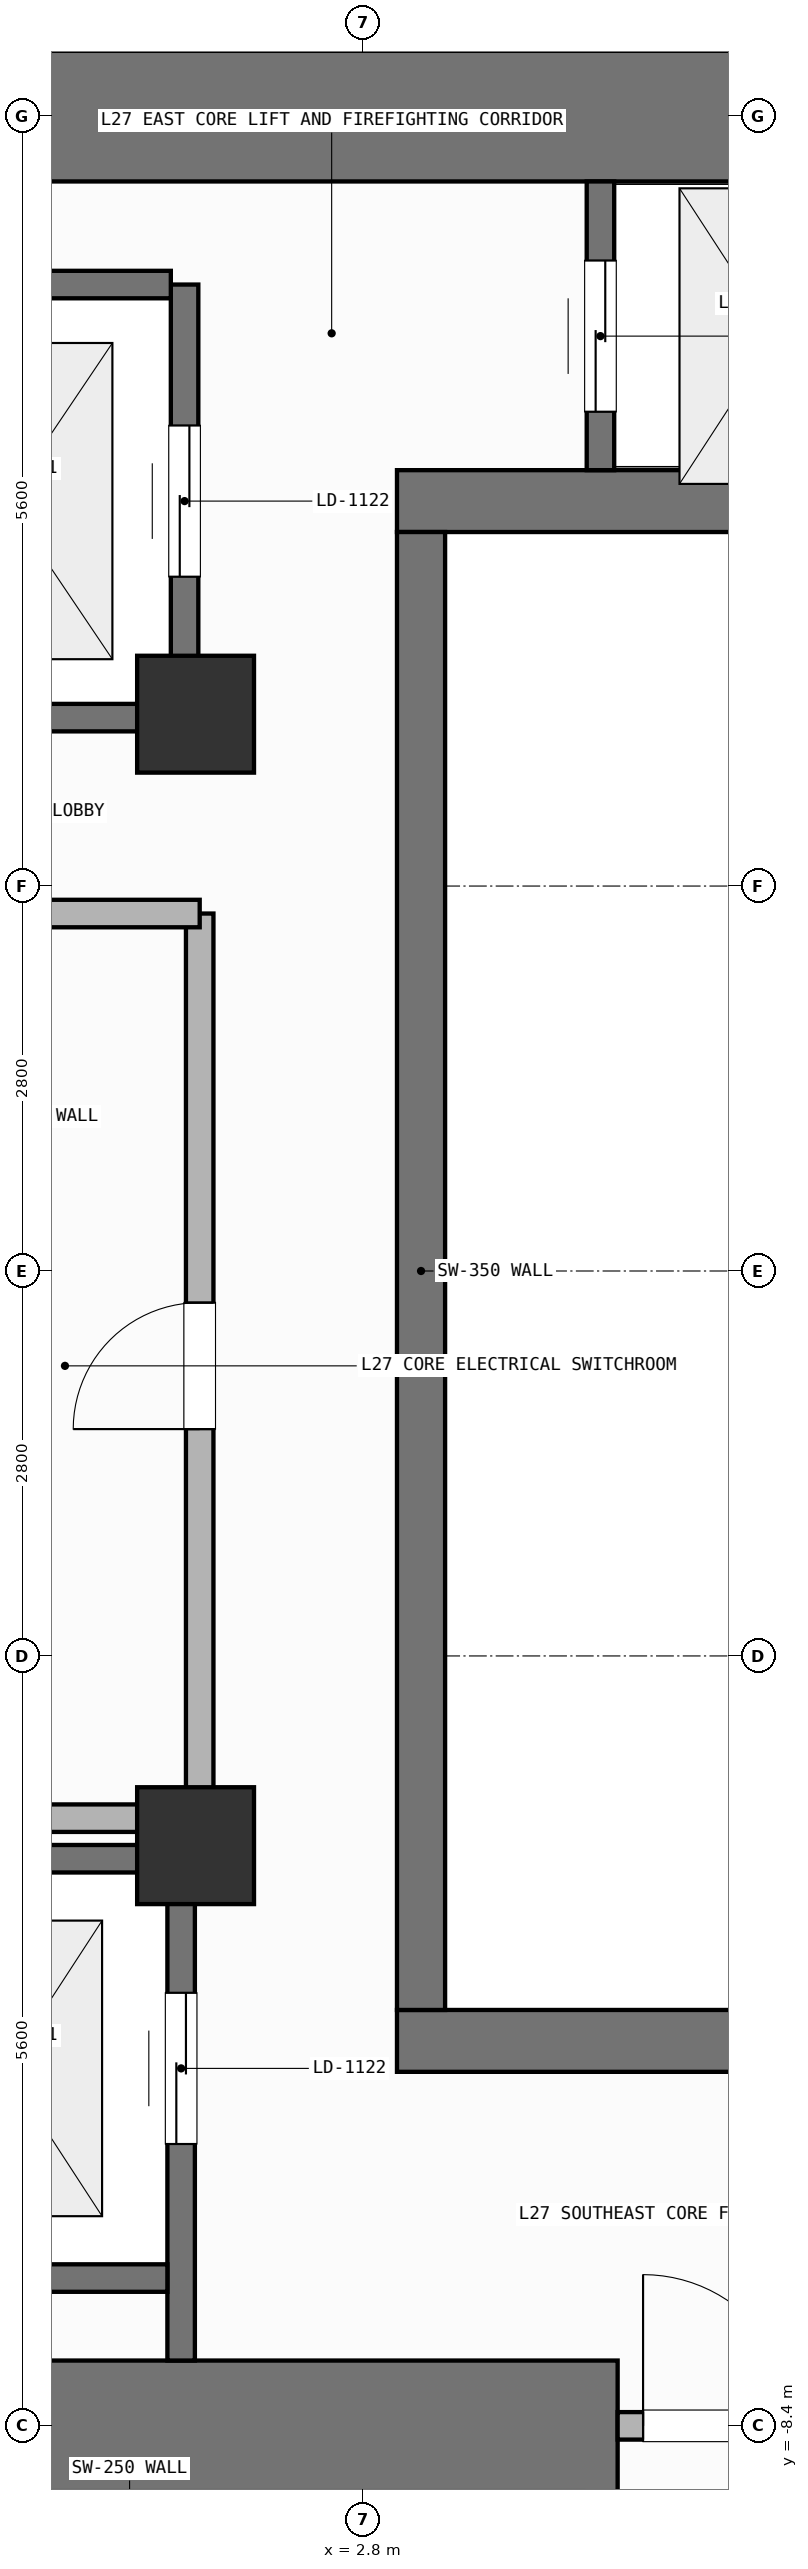
"""IFC4 building model, lengths in metres.
Left out: names, types, materials, properties, quantities, classifications, styles, units other than length and angle.
Written with IfcOpenShell. Run it as: python <this file> out.ifc"""

import sys

from ifc_helpers import new_model, si_unit, direction, frame, frame_2d, origin, origin_2d, place, context, subcontext, project, spatial, rectangle, extrude, element, fill, save


model = new_model("IFC4")
c1 = context("Model", 3, precision=1e-05, world=origin(), true_north=direction((0.0, 1.0)))
c2 = subcontext(c1, "Body", "Model", "MODEL_VIEW")
j1 = project(units=[si_unit("LENGTHUNIT", "METRE"), si_unit("PLANEANGLEUNIT", "RADIAN")], contexts=[c1])
p1 = place(None, origin())
s1 = spatial("IfcSite", under=j1, at=p1, CompositionType="ELEMENT")
p2 = place(p1, origin())
s2 = spatial("IfcBuilding", under=s1, at=p2, CompositionType="ELEMENT")
p3 = place(p2, frame((0.0, 0.0, 108.6)))
s3 = spatial("IfcBuildingStorey", under=s2, at=p3, CompositionType="ELEMENT", Elevation=108.6)
p4 = place(p3, frame((-2.62, -8.4, 0.0), z_axis=(0.0, 0.0, 1.0), x_axis=(1.0, 0.0, 0.0)))
e1 = element("IfcWall", 1, at=p4, inside=s3, PredefinedType="SHEAR", context=c2, shape_type="SweptSolid", body=[
    extrude(rectangle(XDim=7.27, YDim=0.95, at=frame_2d((3.635, 0.0))), origin(), (0.0, 0.0, 1.0), 4.8),
])
p5 = place(p3, frame((-7.55, 8.4, 0.0), z_axis=(0.0, 0.0, 1.0), x_axis=(1.0, 0.0, 0.0)))
e2 = element("IfcWall", 2, at=p5, inside=s3, PredefinedType="SHEAR", context=c2, shape_type="SweptSolid", body=[
    extrude(rectangle(XDim=16.425, YDim=0.95, at=frame_2d((8.212, 0.0))), origin(), (0.0, 0.0, 1.0), 4.8),
])
for number, where, z_axis, x_axis in (
    (3, (3.045, -5.6, 0.0), (0.0, 0.0, 1.0), (1.0, 0.0, 0.0)),
    (4, (3.045, 5.6, 0.0), (0.0, 0.0, 1.0), (1.0, 0.0, 0.0)),
):
    element("IfcWall", number, at=place(p3, frame(where, z_axis=z_axis, x_axis=x_axis)), inside=s3, PredefinedType="SHEAR", context=c2, shape_type="SweptSolid", body=[
        extrude(rectangle(XDim=5.83, YDim=0.45, at=frame_2d((2.915, 0.0))), origin(), (0.0, 0.0, 1.0), 4.8),
    ])
p6 = place(p3, frame((3.22, -5.375, 0.0), z_axis=(0.0, 0.0, 1.0), x_axis=(0.0, 1.0, 0.0)))
e5 = element("IfcWall", 5, at=p6, inside=s3, PredefinedType="SHEAR", context=c2, shape_type="SweptSolid", body=[
    extrude(rectangle(XDim=10.75, YDim=0.35, at=frame_2d((5.375, 0.0))), origin(), (0.0, 0.0, 1.0), 4.8),
])
for number, where, z_axis, x_axis in (
    (6, (1.58, -4.18, 0.0), (0.0, 0.0, 1.0), (1.0, 0.0, 0.0)),
    (7, (1.58, 4.05, 0.0), (0.0, 0.0, 1.0), (1.0, 0.0, 0.0)),
):
    element("IfcColumn", number, at=place(p3, frame(where, z_axis=z_axis, x_axis=x_axis)), inside=s3, PredefinedType="COLUMN", context=c2, shape_type="SweptSolid", body=[
        extrude(rectangle(XDim=0.85, YDim=0.85, at=origin_2d()), origin(), (0.0, 0.0, 1.0), 4.8),
    ])
p7 = place(p3, frame((1.5, 4.025, 0.0), z_axis=(0.0, 0.0, 1.0), x_axis=(0.0, 1.0, 0.0)))
e8 = element("IfcWall", 8, at=p7, inside=s3, PredefinedType="SHEAR", context=c2, shape_type="SweptSolid", body=[
    extrude(rectangle(XDim=3.15, YDim=0.2, at=frame_2d((1.575, 0.0))), origin(), (0.0, 0.0, 1.0), 4.58),
])
p8 = place(p7, frame((1.025, 0.0, 0.0)))
e9 = element("IfcOpeningElement", 9, at=p8, cuts=e8, PredefinedType="OPENING", context=c2, shape_type="SweptSolid", body=[
    extrude(rectangle(XDim=1.1, YDim=2.2, at=frame_2d((0.55, 1.1))), frame((0.0, 0.11, 0.0), z_axis=(0.0, -1.0, 0.0), x_axis=(1.0, 0.0, 0.0)), (0.0, 0.0, 1.0), 0.22),
])
for number, where, z_axis, x_axis in (
    (10, (-1.0, 4.025, 0.0), (0.0, 0.0, 1.0), (1.0, 0.0, 0.0)),
    (11, (-1.0, 7.175, 0.0), (0.0, 0.0, 1.0), (1.0, 0.0, 0.0)),
):
    element("IfcWall", number, at=place(p3, frame(where, z_axis=z_axis, x_axis=x_axis)), inside=s3, PredefinedType="SHEAR", context=c2, shape_type="SweptSolid", body=[
        extrude(rectangle(XDim=2.4, YDim=0.2, at=frame_2d((1.2, 0.0))), origin(), (0.0, 0.0, 1.0), 4.58),
    ])
p9 = place(p3, frame((1.475, -7.925, 0.0), z_axis=(0.0, 0.0, 1.0), x_axis=(0.0, 1.0, 0.0)))
e12 = element("IfcWall", 12, at=p9, inside=s3, PredefinedType="SHEAR", context=c2, shape_type="SweptSolid", body=[
    extrude(rectangle(XDim=3.65, YDim=0.2, at=frame_2d((1.825, 0.0))), origin(), (0.0, 0.0, 1.0), 4.58),
])
p10 = place(p9, frame((1.575, 0.0, 0.0)))
e13 = element("IfcOpeningElement", 13, at=p10, cuts=e12, PredefinedType="OPENING", context=c2, shape_type="SweptSolid", body=[
    extrude(rectangle(XDim=1.1, YDim=2.2, at=frame_2d((0.55, 1.1))), frame((0.0, 0.11, 0.0), z_axis=(0.0, -1.0, 0.0), x_axis=(1.0, 0.0, 0.0)), (0.0, 0.0, 1.0), 0.22),
])
for number, where, z_axis, x_axis in (
    (14, (-0.975, -7.325, 0.0), (0.0, 0.0, 1.0), (1.0, 0.0, 0.0)),
    (15, (-0.975, -4.275, 0.0), (0.0, 0.0, 1.0), (1.0, 0.0, 0.0)),
):
    element("IfcWall", number, at=place(p3, frame(where, z_axis=z_axis, x_axis=x_axis)), inside=s3, PredefinedType="SHEAR", context=c2, shape_type="SweptSolid", body=[
        extrude(rectangle(XDim=2.35, YDim=0.2, at=frame_2d((1.175, 0.0))), origin(), (0.0, 0.0, 1.0), 4.58),
    ])
p11 = place(p3, frame((4.525, 5.825, 0.0), z_axis=(0.0, 0.0, 1.0), x_axis=(0.0, 1.0, 0.0)))
e16 = element("IfcWall", 16, at=p11, inside=s3, PredefinedType="SHEAR", context=c2, shape_type="SweptSolid", body=[
    extrude(rectangle(XDim=2.1, YDim=0.2, at=frame_2d((1.05, 0.0))), origin(), (0.0, 0.0, 1.0), 4.58),
])
p12 = place(p11, frame((0.425, 0.0, 0.0)))
e17 = element("IfcOpeningElement", 17, at=p12, cuts=e16, PredefinedType="OPENING", context=c2, shape_type="SweptSolid", body=[
    extrude(rectangle(XDim=1.1, YDim=2.2, at=frame_2d((0.55, 1.1))), frame((0.0, 0.11, 0.0), z_axis=(0.0, -1.0, 0.0), x_axis=(1.0, 0.0, 0.0)), (0.0, 0.0, 1.0), 0.22),
])
p13 = place(p3, frame((4.65, -8.4, 0.0), z_axis=(0.0, 0.0, 1.0), x_axis=(1.0, 0.0, 0.0)))
e18 = element("IfcWall", 18, at=p13, inside=s3, PredefinedType="SOLIDWALL", context=c2, shape_type="SweptSolid", body=[
    extrude(rectangle(XDim=1.47, YDim=0.2, at=frame_2d((0.735, 0.0))), origin(), (0.0, 0.0, 1.0), 3.62),
])
p14 = place(p13, frame((0.185, 0.0, 0.0)))
e19 = element("IfcOpeningElement", 19, at=p14, cuts=e18, PredefinedType="OPENING", context=c2, shape_type="SweptSolid", body=[
    extrude(rectangle(XDim=1.1, YDim=2.15, at=frame_2d((0.55, 1.075))), frame((0.0, 0.11, 0.0), z_axis=(0.0, -1.0, 0.0), x_axis=(1.0, 0.0, 0.0)), (0.0, 0.0, 1.0), 0.22),
])
p15 = place(p3, frame((1.61, -3.98, 0.0), z_axis=(0.0, 0.0, 1.0), x_axis=(0.0, 1.0, 0.0)))
e20 = element("IfcWall", 20, at=p15, inside=s3, PredefinedType="SOLIDWALL", context=c2, shape_type="SweptSolid", body=[
    extrude(rectangle(XDim=6.58, YDim=0.2, at=frame_2d((3.29, 0.0))), origin(), (0.0, 0.0, 1.0), 4.58),
])
p16 = place(p15, frame((2.83, 0.0, 0.0)))
e21 = element("IfcOpeningElement", 21, at=p16, cuts=e20, PredefinedType="OPENING", context=c2, shape_type="SweptSolid", body=[
    extrude(rectangle(XDim=0.92, YDim=2.1, at=frame_2d((0.46, 1.05))), frame((0.0, 0.11, 0.0), z_axis=(0.0, -1.0, 0.0), x_axis=(1.0, 0.0, 0.0)), (0.0, 0.0, 1.0), 0.22),
])
for number, where, z_axis, x_axis in (
    (22, (-1.58, -3.98, 0.0), (0.0, 0.0, 1.0), (1.0, 0.0, 0.0)),
    (23, (-1.58, 2.6, 0.0), (0.0, 0.0, 1.0), (1.0, 0.0, 0.0)),
):
    element("IfcWall", number, at=place(p3, frame(where, z_axis=z_axis, x_axis=x_axis)), inside=s3, PredefinedType="SOLIDWALL", context=c2, shape_type="SweptSolid", body=[
        extrude(rectangle(XDim=3.19, YDim=0.2, at=frame_2d((1.595, 0.0))), origin(), (0.0, 0.0, 1.0), 4.58),
    ])
p17 = place(p8, origin())
e24 = element("IfcDoor", 24, at=p17, inside=s3, OperationType="SLIDING_TO_LEFT", PredefinedType="DOOR", context=c2, shape_type="SweptSolid", body=[
    extrude(rectangle(XDim=1.1, YDim=2.2, at=frame_2d((0.55, 1.1))), frame((0.0, 0.025, 0.0), z_axis=(0.0, -1.0, 0.0), x_axis=(1.0, 0.0, 0.0)), (0.0, 0.0, 1.0), 0.05),
])
fill(e9, e24)
p18 = place(p10, origin())
e25 = element("IfcDoor", 25, at=p18, inside=s3, OperationType="SLIDING_TO_LEFT", PredefinedType="DOOR", context=c2, shape_type="SweptSolid", body=[
    extrude(rectangle(XDim=1.1, YDim=2.2, at=frame_2d((0.55, 1.1))), frame((0.0, 0.025, 0.0), z_axis=(0.0, -1.0, 0.0), x_axis=(1.0, 0.0, 0.0)), (0.0, 0.0, 1.0), 0.05),
])
fill(e13, e25)
p19 = place(p12, origin())
e26 = element("IfcDoor", 26, at=p19, inside=s3, OperationType="SLIDING_TO_LEFT", PredefinedType="DOOR", context=c2, shape_type="SweptSolid", body=[
    extrude(rectangle(XDim=1.1, YDim=2.2, at=frame_2d((0.55, 1.1))), frame((0.0, 0.025, 0.0), z_axis=(0.0, -1.0, 0.0), x_axis=(1.0, 0.0, 0.0)), (0.0, 0.0, 1.0), 0.05),
])
fill(e17, e26)
p20 = place(p14, origin())
e27 = element("IfcDoor", 27, at=p20, inside=s3, OperationType="SINGLE_SWING_LEFT", PredefinedType="DOOR", context=c2, shape_type="SweptSolid", body=[
    extrude(rectangle(XDim=1.1, YDim=2.15, at=frame_2d((0.55, 1.075))), frame((0.0, 0.025, 0.0), z_axis=(0.0, -1.0, 0.0), x_axis=(1.0, 0.0, 0.0)), (0.0, 0.0, 1.0), 0.05),
])
fill(e19, e27)
p21 = place(p16, origin())
e28 = element("IfcDoor", 28, at=p21, inside=s3, OperationType="SINGLE_SWING_LEFT", PredefinedType="DOOR", context=c2, shape_type="SweptSolid", body=[
    extrude(rectangle(XDim=0.92, YDim=2.1, at=frame_2d((0.46, 1.05))), frame((0.0, 0.025, 0.0), z_axis=(0.0, -1.0, 0.0), x_axis=(1.0, 0.0, 0.0)), (0.0, 0.0, 1.0), 0.05),
])
fill(e21, e28)
save(model, sys.argv[1])
